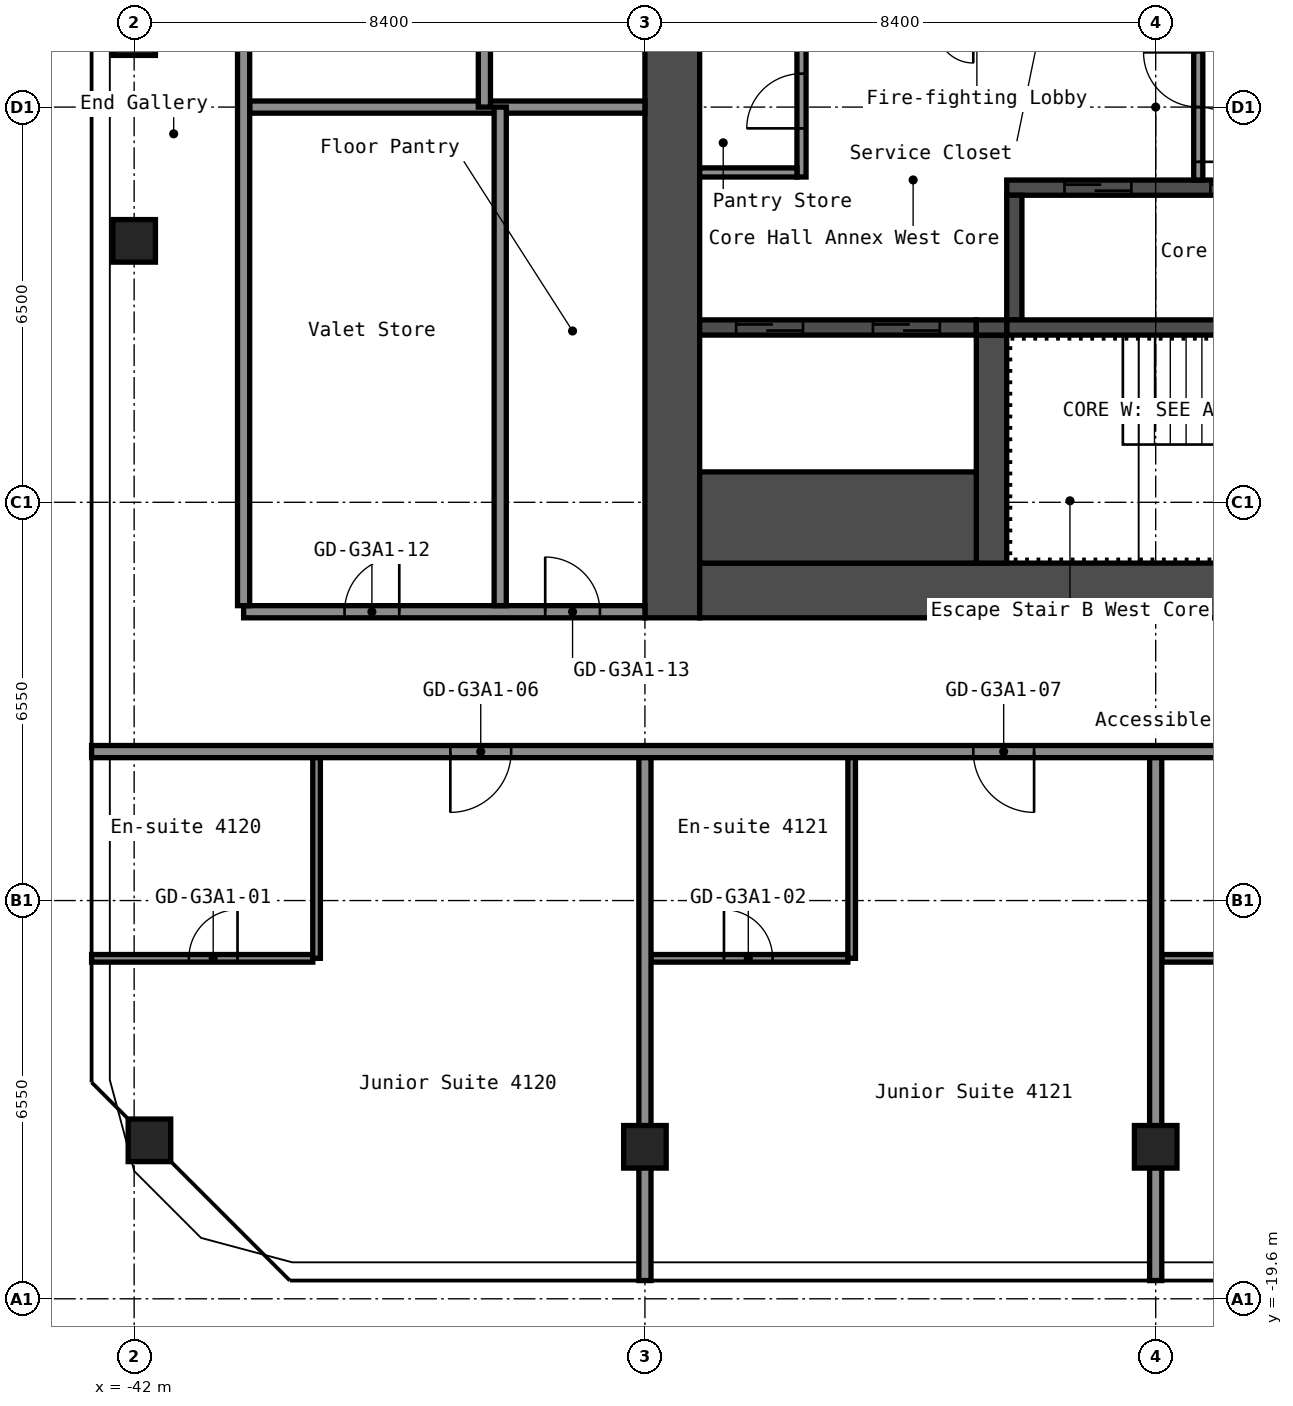
"""IFC4 building model, lengths in metres.
Left out: names, types, materials, properties, quantities, classifications, styles, units other than length and angle.
Written with IfcOpenShell. Run it as: python <this file> out.ifc"""

import sys

from ifc_helpers import new_model, si_unit, direction, frame, frame_2d, origin, origin_2d, place, context, subcontext, project, spatial, rectangle, hollow_rectangle, extrude, element, fill, save


model = new_model("IFC4")
c1 = context("Model", 3, precision=1e-05, world=origin(), true_north=direction((0.0, 1.0)))
c2 = subcontext(c1, "Body", "Model", "MODEL_VIEW")
j1 = project(units=[si_unit("LENGTHUNIT", "METRE"), si_unit("PLANEANGLEUNIT", "RADIAN")], contexts=[c1])
p1 = place(None, origin())
s1 = spatial("IfcSite", under=j1, at=p1, CompositionType="ELEMENT")
p2 = place(p1, origin())
s2 = spatial("IfcBuilding", under=s1, at=p2, CompositionType="ELEMENT")
p3 = place(p2, frame((0.0, 0.0, 147.0)))
s3 = spatial("IfcBuildingStorey", under=s2, at=p3, CompositionType="ELEMENT", Elevation=147.0)
for number, where, z_axis, x_axis in (
    (1, (-41.749, -16.994, 0.0), (0.0, 0.0, 1.0), (1.0, 0.0, 0.0)),
    (2, (-42.0, -2.2, 0.0), (0.0, 0.0, 1.0), (1.0, 0.0, 0.0)),
    (3, (-42.0, 1.2, 0.0), (0.0, 0.0, 1.0), (1.0, 0.0, 0.0)),
    (4, (-33.6, -17.1, 0.0), (0.0, 0.0, 1.0), (1.0, 0.0, 0.0)),
    (5, (-25.2, -17.1, 0.0), (0.0, 0.0, 1.0), (1.0, 0.0, 0.0)),
):
    element("IfcColumn", number, at=place(p3, frame(where, z_axis=z_axis, x_axis=x_axis)), inside=s3, PredefinedType="COLUMN", context=c2, shape_type="SweptSolid", body=[
        extrude(hollow_rectangle(XDim=0.7, YDim=0.7, WallThickness=0.028, at=origin_2d()), origin(), (0.0, 0.0, 1.0), 2.75),
    ])
p4 = place(p3, frame((-33.15, -8.4, 0.0), z_axis=(0.0, 0.0, 1.0), x_axis=(0.0, 1.0, 0.0)))
e6 = element("IfcWall", 6, at=p4, inside=s3, PredefinedType="SHEAR", context=c2, shape_type="SweptSolid", body=[
    extrude(rectangle(XDim=16.8, YDim=0.9, at=frame_2d((8.4, 0.0))), origin(), (0.0, 0.0, 1.0), 2.75),
])
p5 = place(p3, frame((-32.7, -7.95, 0.0), z_axis=(0.0, 0.0, 1.0), x_axis=(1.0, 0.0, 0.0)))
e7 = element("IfcWall", 7, at=p5, inside=s3, PredefinedType="SHEAR", context=c2, shape_type="SweptSolid", body=[
    extrude(rectangle(XDim=15.0, YDim=0.9, at=frame_2d((7.5, 0.0))), origin(), (0.0, 0.0, 1.0), 2.75),
])
p6 = place(p5, frame((11.45, 0.0, 0.0)))
e8 = element("IfcOpeningElement", 8, at=p6, cuts=e7, PredefinedType="OPENING", context=c2, shape_type="SweptSolid", body=[
    extrude(rectangle(XDim=1.0, YDim=2.1, at=frame_2d((0.5, 1.05))), frame((0.0, 0.46, 0.0), z_axis=(0.0, -1.0, 0.0), x_axis=(1.0, 0.0, 0.0)), (0.0, 0.0, 1.0), 0.92),
])
p7 = place(p3, frame((-27.65, -1.325, 0.0), z_axis=(0.0, 0.0, 1.0), x_axis=(1.0, 0.0, 0.0)))
e9 = element("IfcWall", 9, at=p7, inside=s3, PredefinedType="SHEAR", context=c2, shape_type="SweptSolid", body=[
    extrude(rectangle(XDim=7.5, YDim=0.25, at=frame_2d((3.75, 0.0))), origin(), (0.0, 0.0, 1.0), 2.75),
])
p8 = place(p7, frame((5.75, 0.0, 0.0)))
e10 = element("IfcOpeningElement", 10, at=p8, cuts=e9, PredefinedType="OPENING", context=c2, shape_type="SweptSolid", body=[
    extrude(rectangle(XDim=1.1, YDim=2.1, at=frame_2d((0.55, 1.05))), frame((0.0, 0.135, 0.0), z_axis=(0.0, -1.0, 0.0), x_axis=(1.0, 0.0, 0.0)), (0.0, 0.0, 1.0), 0.27),
])
p9 = place(p7, frame((3.35, 0.0, 0.0)))
e11 = element("IfcOpeningElement", 11, at=p9, cuts=e9, PredefinedType="OPENING", context=c2, shape_type="SweptSolid", body=[
    extrude(rectangle(XDim=1.1, YDim=2.1, at=frame_2d((0.55, 1.05))), frame((0.0, 0.135, 0.0), z_axis=(0.0, -1.0, 0.0), x_axis=(1.0, 0.0, 0.0)), (0.0, 0.0, 1.0), 0.27),
])
p10 = place(p7, frame((0.95, 0.0, 0.0)))
e12 = element("IfcOpeningElement", 12, at=p10, cuts=e9, PredefinedType="OPENING", context=c2, shape_type="SweptSolid", body=[
    extrude(rectangle(XDim=1.1, YDim=2.1, at=frame_2d((0.55, 1.05))), frame((0.0, 0.135, 0.0), z_axis=(0.0, -1.0, 0.0), x_axis=(1.0, 0.0, 0.0)), (0.0, 0.0, 1.0), 0.27),
])
p11 = place(p3, frame((-27.525, -3.5, 0.0), z_axis=(0.0, 0.0, 1.0), x_axis=(0.0, 1.0, 0.0)))
e13 = element("IfcWall", 13, at=p11, inside=s3, PredefinedType="SHEAR", context=c2, shape_type="SweptSolid", body=[
    extrude(rectangle(XDim=2.05, YDim=0.25, at=frame_2d((1.025, 0.0))), origin(), (0.0, 0.0, 1.0), 2.75),
])
p12 = place(p3, frame((-27.65, -3.625, 0.0), z_axis=(0.0, 0.0, 1.0), x_axis=(1.0, 0.0, 0.0)))
e14 = element("IfcWall", 14, at=p12, inside=s3, PredefinedType="SHEAR", context=c2, shape_type="SweptSolid", body=[
    extrude(rectangle(XDim=7.5, YDim=0.25, at=frame_2d((3.75, 0.0))), origin(), (0.0, 0.0, 1.0), 2.75),
])
p13 = place(p3, frame((-27.9, -7.5, 0.0), z_axis=(0.0, 0.0, 1.0), x_axis=(0.0, 1.0, 0.0)))
e15 = element("IfcWall", 15, at=p13, inside=s3, PredefinedType="SHEAR", context=c2, shape_type="SweptSolid", body=[
    extrude(rectangle(XDim=3.75, YDim=0.5, at=frame_2d((1.875, 0.0))), origin(), (0.0, 0.0, 1.0), 2.75),
])
p14 = place(p3, frame((-32.7, -3.625, 0.0), z_axis=(0.0, 0.0, 1.0), x_axis=(1.0, 0.0, 0.0)))
e16 = element("IfcWall", 16, at=p14, inside=s3, PredefinedType="SHEAR", context=c2, shape_type="SweptSolid", body=[
    extrude(rectangle(XDim=4.55, YDim=0.25, at=frame_2d((2.275, 0.0))), origin(), (0.0, 0.0, 1.0), 2.75),
])
p15 = place(p14, frame((2.85, 0.0, 0.0)))
e17 = element("IfcOpeningElement", 17, at=p15, cuts=e16, PredefinedType="OPENING", context=c2, shape_type="SweptSolid", body=[
    extrude(rectangle(XDim=1.1, YDim=2.1, at=frame_2d((0.55, 1.05))), frame((0.0, 0.135, 0.0), z_axis=(0.0, -1.0, 0.0), x_axis=(1.0, 0.0, 0.0)), (0.0, 0.0, 1.0), 0.27),
])
p16 = place(p14, frame((0.6, 0.0, 0.0)))
e18 = element("IfcOpeningElement", 18, at=p16, cuts=e16, PredefinedType="OPENING", context=c2, shape_type="SweptSolid", body=[
    extrude(rectangle(XDim=1.1, YDim=2.1, at=frame_2d((0.55, 1.05))), frame((0.0, 0.135, 0.0), z_axis=(0.0, -1.0, 0.0), x_axis=(1.0, 0.0, 0.0)), (0.0, 0.0, 1.0), 0.27),
])
p17 = place(p3, frame((-32.7, -6.75, 0.0), z_axis=(0.0, 0.0, 1.0), x_axis=(1.0, 0.0, 0.0)))
e19 = element("IfcWall", 19, at=p17, inside=s3, PredefinedType="SHEAR", context=c2, shape_type="SweptSolid", body=[
    extrude(rectangle(XDim=4.55, YDim=1.5, at=frame_2d((2.275, 0.0))), origin(), (0.0, 0.0, 1.0), 2.75),
])
p18 = place(p3, frame((-28.15, -3.625, 0.0), z_axis=(0.0, 0.0, 1.0), x_axis=(1.0, 0.0, 0.0)))
e20 = element("IfcWall", 20, at=p18, inside=s3, PredefinedType="SHEAR", context=c2, shape_type="SweptSolid", body=[
    extrude(rectangle(XDim=0.5, YDim=0.25, at=frame_2d((0.25, 0.0))), origin(), (0.0, 0.0, 1.0), 2.75),
])
p19 = place(p3, frame((-24.5, -1.2, 0.0), z_axis=(0.0, 0.0, 1.0), x_axis=(0.0, 1.0, 0.0)))
e21 = element("IfcWall", 21, at=p19, inside=s3, PredefinedType="PARTITIONING", context=c2, shape_type="SweptSolid", body=[
    extrude(rectangle(XDim=2.4, YDim=0.15, at=frame_2d((1.2, 0.0))), origin(), (0.0, 0.0, 1.0), 2.75),
])
p20 = place(p19, frame((0.3, 0.0, 0.0)))
e22 = element("IfcOpeningElement", 22, at=p20, cuts=e21, PredefinedType="OPENING", context=c2, shape_type="SweptSolid", body=[
    extrude(rectangle(XDim=1.8, YDim=2.1, at=frame_2d((0.9, 1.05))), frame((0.0, 0.085, 0.0), z_axis=(0.0, -1.0, 0.0), x_axis=(1.0, 0.0, 0.0)), (0.0, 0.0, 1.0), 0.17),
])
p21 = place(p3, frame((-31.025, -1.15, 0.0), z_axis=(0.0, 0.0, 1.0), x_axis=(0.0, 1.0, 0.0)))
e23 = element("IfcWall", 23, at=p21, inside=s3, PredefinedType="PARTITIONING", context=c2, shape_type="SweptSolid", body=[
    extrude(rectangle(XDim=2.35, YDim=0.15, at=frame_2d((1.175, 0.0))), origin(), (0.0, 0.0, 1.0), 2.75),
])
p22 = place(p21, frame((0.8, 0.0, 0.0)))
e24 = element("IfcOpeningElement", 24, at=p22, cuts=e23, PredefinedType="OPENING", context=c2, shape_type="SweptSolid", body=[
    extrude(rectangle(XDim=0.9, YDim=2.1, at=frame_2d((0.45, 1.05))), frame((0.0, 0.085, 0.0), z_axis=(0.0, -1.0, 0.0), x_axis=(1.0, 0.0, 0.0)), (0.0, 0.0, 1.0), 0.17),
])
p23 = place(p3, frame((-32.7, -1.075, 0.0), z_axis=(0.0, 0.0, 1.0), x_axis=(1.0, 0.0, 0.0)))
e25 = element("IfcWall", 25, at=p23, inside=s3, PredefinedType="PARTITIONING", context=c2, shape_type="SweptSolid", body=[
    extrude(rectangle(XDim=1.6, YDim=0.15, at=frame_2d((0.8, 0.0))), origin(), (0.0, 0.0, 1.0), 2.75),
])
p24 = place(p3, frame((-42.7, -14.0, 0.0), z_axis=(0.0, 0.0, 1.0), x_axis=(1.0, 0.0, 0.0)))
e26 = element("IfcWall", 26, at=p24, inside=s3, PredefinedType="PARTITIONING", context=c2, shape_type="SweptSolid", body=[
    extrude(rectangle(XDim=3.637, YDim=0.125, at=frame_2d((1.819, 0.0))), origin(), (0.0, 0.0, 1.0), 2.75),
])
p25 = place(p24, frame((1.6, 0.0, 0.0)))
e27 = element("IfcOpeningElement", 27, at=p25, cuts=e26, PredefinedType="OPENING", context=c2, shape_type="SweptSolid", body=[
    extrude(rectangle(XDim=0.8, YDim=2.1, at=frame_2d((0.4, 1.05))), frame((0.0, 0.073, 0.0), z_axis=(0.0, -1.0, 0.0), x_axis=(1.0, 0.0, 0.0)), (0.0, 0.0, 1.0), 0.145),
])
p26 = place(p3, frame((-33.5, -14.0, 0.0), z_axis=(0.0, 0.0, 1.0), x_axis=(1.0, 0.0, 0.0)))
e28 = element("IfcWall", 28, at=p26, inside=s3, PredefinedType="PARTITIONING", context=c2, shape_type="SweptSolid", body=[
    extrude(rectangle(XDim=3.238, YDim=0.125, at=frame_2d((1.619, 0.0))), origin(), (0.0, 0.0, 1.0), 2.75),
])
p27 = place(p26, frame((1.2, 0.0, 0.0)))
e29 = element("IfcOpeningElement", 29, at=p27, cuts=e28, PredefinedType="OPENING", context=c2, shape_type="SweptSolid", body=[
    extrude(rectangle(XDim=0.8, YDim=2.1, at=frame_2d((0.4, 1.05))), frame((0.0, 0.073, 0.0), z_axis=(0.0, -1.0, 0.0), x_axis=(1.0, 0.0, 0.0)), (0.0, 0.0, 1.0), 0.145),
])
p28 = place(p3, frame((-25.1, -14.0, 0.0), z_axis=(0.0, 0.0, 1.0), x_axis=(1.0, 0.0, 0.0)))
e30 = element("IfcWall", 30, at=p28, inside=s3, PredefinedType="PARTITIONING", context=c2, shape_type="SweptSolid", body=[
    extrude(rectangle(XDim=3.438, YDim=0.125, at=frame_2d((1.719, 0.0))), origin(), (0.0, 0.0, 1.0), 2.75),
])
p29 = place(p3, frame((-42.7, -10.6, 0.0), z_axis=(0.0, 0.0, 1.0), x_axis=(1.0, 0.0, 0.0)))
e31 = element("IfcWall", 31, at=p29, inside=s3, PredefinedType="PARTITIONING", context=c2, shape_type="SweptSolid", body=[
    extrude(rectangle(XDim=25.9, YDim=0.2, at=frame_2d((12.95, 0.0))), origin(), (0.0, 0.0, 1.0), 2.75),
])
p30 = place(p29, frame((5.9, 0.0, 0.0)))
e32 = element("IfcOpeningElement", 32, at=p30, cuts=e31, PredefinedType="OPENING", context=c2, shape_type="SweptSolid", body=[
    extrude(rectangle(XDim=1.0, YDim=2.1, at=frame_2d((0.5, 1.05))), frame((0.0, 0.11, 0.0), z_axis=(0.0, -1.0, 0.0), x_axis=(1.0, 0.0, 0.0)), (0.0, 0.0, 1.0), 0.22),
])
p31 = place(p29, frame((14.5, 0.0, 0.0)))
e33 = element("IfcOpeningElement", 33, at=p31, cuts=e31, PredefinedType="OPENING", context=c2, shape_type="SweptSolid", body=[
    extrude(rectangle(XDim=1.0, YDim=2.1, at=frame_2d((0.5, 1.05))), frame((0.0, 0.11, 0.0), z_axis=(0.0, -1.0, 0.0), x_axis=(1.0, 0.0, 0.0)), (0.0, 0.0, 1.0), 0.22),
])
p32 = place(p29, frame((23.0, 0.0, 0.0)))
e34 = element("IfcOpeningElement", 34, at=p32, cuts=e31, PredefinedType="OPENING", context=c2, shape_type="SweptSolid", body=[
    extrude(rectangle(XDim=1.0, YDim=2.1, at=frame_2d((0.5, 1.05))), frame((0.0, 0.11, 0.0), z_axis=(0.0, -1.0, 0.0), x_axis=(1.0, 0.0, 0.0)), (0.0, 0.0, 1.0), 0.22),
])
p33 = place(p3, frame((-40.2, -8.3, 0.0), z_axis=(0.0, 0.0, 1.0), x_axis=(1.0, 0.0, 0.0)))
e35 = element("IfcWall", 35, at=p33, inside=s3, PredefinedType="PARTITIONING", context=c2, shape_type="SweptSolid", body=[
    extrude(rectangle(XDim=6.6, YDim=0.2, at=frame_2d((3.3, 0.0))), origin(), (0.0, 0.0, 1.0), 2.75),
])
p34 = place(p33, frame((1.66, 0.0, 0.0)))
e36 = element("IfcOpeningElement", 36, at=p34, cuts=e35, PredefinedType="OPENING", context=c2, shape_type="SweptSolid", body=[
    extrude(rectangle(XDim=0.9, YDim=2.1, at=frame_2d((0.45, 1.05))), frame((0.0, 0.11, 0.0), z_axis=(0.0, -1.0, 0.0), x_axis=(1.0, 0.0, 0.0)), (0.0, 0.0, 1.0), 0.22),
])
p35 = place(p33, frame((4.96, 0.0, 0.0)))
e37 = element("IfcOpeningElement", 37, at=p35, cuts=e35, PredefinedType="OPENING", context=c2, shape_type="SweptSolid", body=[
    extrude(rectangle(XDim=0.9, YDim=2.1, at=frame_2d((0.45, 1.05))), frame((0.0, 0.11, 0.0), z_axis=(0.0, -1.0, 0.0), x_axis=(1.0, 0.0, 0.0)), (0.0, 0.0, 1.0), 0.22),
])
p36 = place(p3, frame((-40.1, 0.0, 0.0), z_axis=(0.0, 0.0, 1.0), x_axis=(1.0, 0.0, 0.0)))
e38 = element("IfcWall", 38, at=p36, inside=s3, PredefinedType="PARTITIONING", context=c2, shape_type="SweptSolid", body=[
    extrude(rectangle(XDim=6.5, YDim=0.2, at=frame_2d((3.25, 0.0))), origin(), (0.0, 0.0, 1.0), 2.75),
])
p37 = place(p3, frame((-40.2, -8.2, 0.0), z_axis=(0.0, 0.0, 1.0), x_axis=(0.0, 1.0, 0.0)))
e39 = element("IfcWall", 39, at=p37, inside=s3, PredefinedType="PARTITIONING", context=c2, shape_type="SweptSolid", body=[
    extrude(rectangle(XDim=16.4, YDim=0.2, at=frame_2d((8.2, 0.0))), origin(), (0.0, 0.0, 1.0), 2.75),
])
p38 = place(p3, frame((-39.0, -14.0, 0.0), z_axis=(0.0, 0.0, 1.0), x_axis=(0.0, 1.0, 0.0)))
e40 = element("IfcWall", 40, at=p38, inside=s3, PredefinedType="PARTITIONING", context=c2, shape_type="SweptSolid", body=[
    extrude(rectangle(XDim=3.3, YDim=0.125, at=frame_2d((1.65, 0.0))), origin(), (0.0, 0.0, 1.0), 2.75),
])
for number, where, z_axis, x_axis in (
    (41, (-36.24, 0.0, 0.0), (0.0, 0.0, 1.0), (0.0, 1.0, 0.0)),
    (42, (-35.98, -8.2, 0.0), (0.0, 0.0, 1.0), (0.0, 1.0, 0.0)),
):
    element("IfcWall", number, at=place(p3, frame(where, z_axis=z_axis, x_axis=x_axis)), inside=s3, PredefinedType="PARTITIONING", context=c2, shape_type="SweptSolid", body=[
        extrude(rectangle(XDim=8.2, YDim=0.2, at=frame_2d((4.1, 0.0))), origin(), (0.0, 0.0, 1.0), 2.75),
    ])
p39 = place(p3, frame((-33.6, -19.3, 0.0), z_axis=(0.0, 0.0, 1.0), x_axis=(0.0, 1.0, 0.0)))
e43 = element("IfcWall", 43, at=p39, inside=s3, PredefinedType="PARTITIONING", context=c2, shape_type="SweptSolid", body=[
    extrude(rectangle(XDim=8.6, YDim=0.2, at=frame_2d((4.3, 0.0))), origin(), (0.0, 0.0, 1.0), 2.75),
])
p40 = place(p3, frame((-30.2, -14.0, 0.0), z_axis=(0.0, 0.0, 1.0), x_axis=(0.0, 1.0, 0.0)))
e44 = element("IfcWall", 44, at=p40, inside=s3, PredefinedType="PARTITIONING", context=c2, shape_type="SweptSolid", body=[
    extrude(rectangle(XDim=3.3, YDim=0.125, at=frame_2d((1.65, 0.0))), origin(), (0.0, 0.0, 1.0), 2.75),
])
p41 = place(p3, frame((-25.2, -19.3, 0.0), z_axis=(0.0, 0.0, 1.0), x_axis=(0.0, 1.0, 0.0)))
e45 = element("IfcWall", 45, at=p41, inside=s3, PredefinedType="PARTITIONING", context=c2, shape_type="SweptSolid", body=[
    extrude(rectangle(XDim=8.6, YDim=0.2, at=frame_2d((4.3, 0.0))), origin(), (0.0, 0.0, 1.0), 2.75),
])
p42 = place(p20, origin())
e46 = element("IfcDoor", 46, at=p42, inside=s3, OperationType="DOUBLE_DOOR_SINGLE_SWING", PredefinedType="DOOR", context=c2, shape_type="SweptSolid", body=[
    extrude(rectangle(XDim=1.8, YDim=2.1, at=frame_2d((0.9, 1.05))), frame((0.0, 0.025, 0.0), z_axis=(0.0, -1.0, 0.0), x_axis=(1.0, 0.0, 0.0)), (0.0, 0.0, 1.0), 0.05),
])
fill(e22, e46)
p43 = place(p22, origin())
e47 = element("IfcDoor", 47, at=p43, inside=s3, OperationType="SINGLE_SWING_RIGHT", PredefinedType="DOOR", context=c2, shape_type="SweptSolid", body=[
    extrude(rectangle(XDim=0.9, YDim=2.1, at=frame_2d((0.45, 1.05))), frame((0.0, 0.025, 0.0), z_axis=(0.0, -1.0, 0.0), x_axis=(1.0, 0.0, 0.0)), (0.0, 0.0, 1.0), 0.05),
])
fill(e24, e47)
p44 = place(p9, origin())
e48 = element("IfcDoor", 48, at=p44, inside=s3, OperationType="DOUBLE_DOOR_SLIDING", PredefinedType="DOOR", context=c2, shape_type="SweptSolid", body=[
    extrude(rectangle(XDim=1.1, YDim=2.1, at=frame_2d((0.55, 1.05))), frame((0.0, 0.025, 0.0), z_axis=(0.0, -1.0, 0.0), x_axis=(1.0, 0.0, 0.0)), (0.0, 0.0, 1.0), 0.05),
])
fill(e11, e48)
p45 = place(p10, origin())
e49 = element("IfcDoor", 49, at=p45, inside=s3, OperationType="DOUBLE_DOOR_SLIDING", PredefinedType="DOOR", context=c2, shape_type="SweptSolid", body=[
    extrude(rectangle(XDim=1.1, YDim=2.1, at=frame_2d((0.55, 1.05))), frame((0.0, 0.025, 0.0), z_axis=(0.0, -1.0, 0.0), x_axis=(1.0, 0.0, 0.0)), (0.0, 0.0, 1.0), 0.05),
])
fill(e12, e49)
p46 = place(p15, origin())
e50 = element("IfcDoor", 50, at=p46, inside=s3, OperationType="DOUBLE_DOOR_SLIDING", PredefinedType="DOOR", context=c2, shape_type="SweptSolid", body=[
    extrude(rectangle(XDim=1.1, YDim=2.1, at=frame_2d((0.55, 1.05))), frame((0.0, 0.025, 0.0), z_axis=(0.0, -1.0, 0.0), x_axis=(1.0, 0.0, 0.0)), (0.0, 0.0, 1.0), 0.05),
])
fill(e17, e50)
p47 = place(p16, origin())
e51 = element("IfcDoor", 51, at=p47, inside=s3, OperationType="DOUBLE_DOOR_SLIDING", PredefinedType="DOOR", context=c2, shape_type="SweptSolid", body=[
    extrude(rectangle(XDim=1.1, YDim=2.1, at=frame_2d((0.55, 1.05))), frame((0.0, 0.025, 0.0), z_axis=(0.0, -1.0, 0.0), x_axis=(1.0, 0.0, 0.0)), (0.0, 0.0, 1.0), 0.05),
])
fill(e18, e51)
p48 = place(p25, origin())
e52 = element("IfcDoor", 52, at=p48, inside=s3, OperationType="SINGLE_SWING_LEFT", PredefinedType="DOOR", context=c2, shape_type="SweptSolid", body=[
    extrude(rectangle(XDim=0.8, YDim=2.1, at=frame_2d((0.4, 1.05))), frame((0.0, 0.025, 0.0), z_axis=(0.0, -1.0, 0.0), x_axis=(1.0, 0.0, 0.0)), (0.0, 0.0, 1.0), 0.05),
])
fill(e27, e52)
p49 = place(p27, origin())
e53 = element("IfcDoor", 53, at=p49, inside=s3, OperationType="SINGLE_SWING_RIGHT", PredefinedType="DOOR", context=c2, shape_type="SweptSolid", body=[
    extrude(rectangle(XDim=0.8, YDim=2.1, at=frame_2d((0.4, 1.05))), frame((0.0, 0.025, 0.0), z_axis=(0.0, -1.0, 0.0), x_axis=(1.0, 0.0, 0.0)), (0.0, 0.0, 1.0), 0.05),
])
fill(e29, e53)
p50 = place(p30, origin())
e54 = element("IfcDoor", 54, at=p50, inside=s3, OperationType="SINGLE_SWING_LEFT", PredefinedType="DOOR", context=c2, shape_type="SweptSolid", body=[
    extrude(rectangle(XDim=1.0, YDim=2.1, at=frame_2d((0.5, 1.05))), frame((0.0, 0.025, 0.0), z_axis=(0.0, -1.0, 0.0), x_axis=(1.0, 0.0, 0.0)), (0.0, 0.0, 1.0), 0.05),
])
fill(e32, e54)
p51 = place(p31, origin())
e55 = element("IfcDoor", 55, at=p51, inside=s3, OperationType="SINGLE_SWING_RIGHT", PredefinedType="DOOR", context=c2, shape_type="SweptSolid", body=[
    extrude(rectangle(XDim=1.0, YDim=2.1, at=frame_2d((0.5, 1.05))), frame((0.0, 0.025, 0.0), z_axis=(0.0, -1.0, 0.0), x_axis=(1.0, 0.0, 0.0)), (0.0, 0.0, 1.0), 0.05),
])
fill(e33, e55)
p52 = place(p34, origin())
e56 = element("IfcDoor", 56, at=p52, inside=s3, OperationType="SINGLE_SWING_LEFT", PredefinedType="DOOR", context=c2, shape_type="SweptSolid", body=[
    extrude(rectangle(XDim=0.9, YDim=2.1, at=frame_2d((0.45, 1.05))), frame((0.0, 0.025, 0.0), z_axis=(0.0, -1.0, 0.0), x_axis=(1.0, 0.0, 0.0)), (0.0, 0.0, 1.0), 0.05),
])
fill(e36, e56)
p53 = place(p35, origin())
e57 = element("IfcDoor", 57, at=p53, inside=s3, OperationType="SINGLE_SWING_RIGHT", PredefinedType="DOOR", context=c2, shape_type="SweptSolid", body=[
    extrude(rectangle(XDim=0.9, YDim=2.1, at=frame_2d((0.45, 1.05))), frame((0.0, 0.025, 0.0), z_axis=(0.0, -1.0, 0.0), x_axis=(1.0, 0.0, 0.0)), (0.0, 0.0, 1.0), 0.05),
])
fill(e37, e57)
save(model, sys.argv[1])
